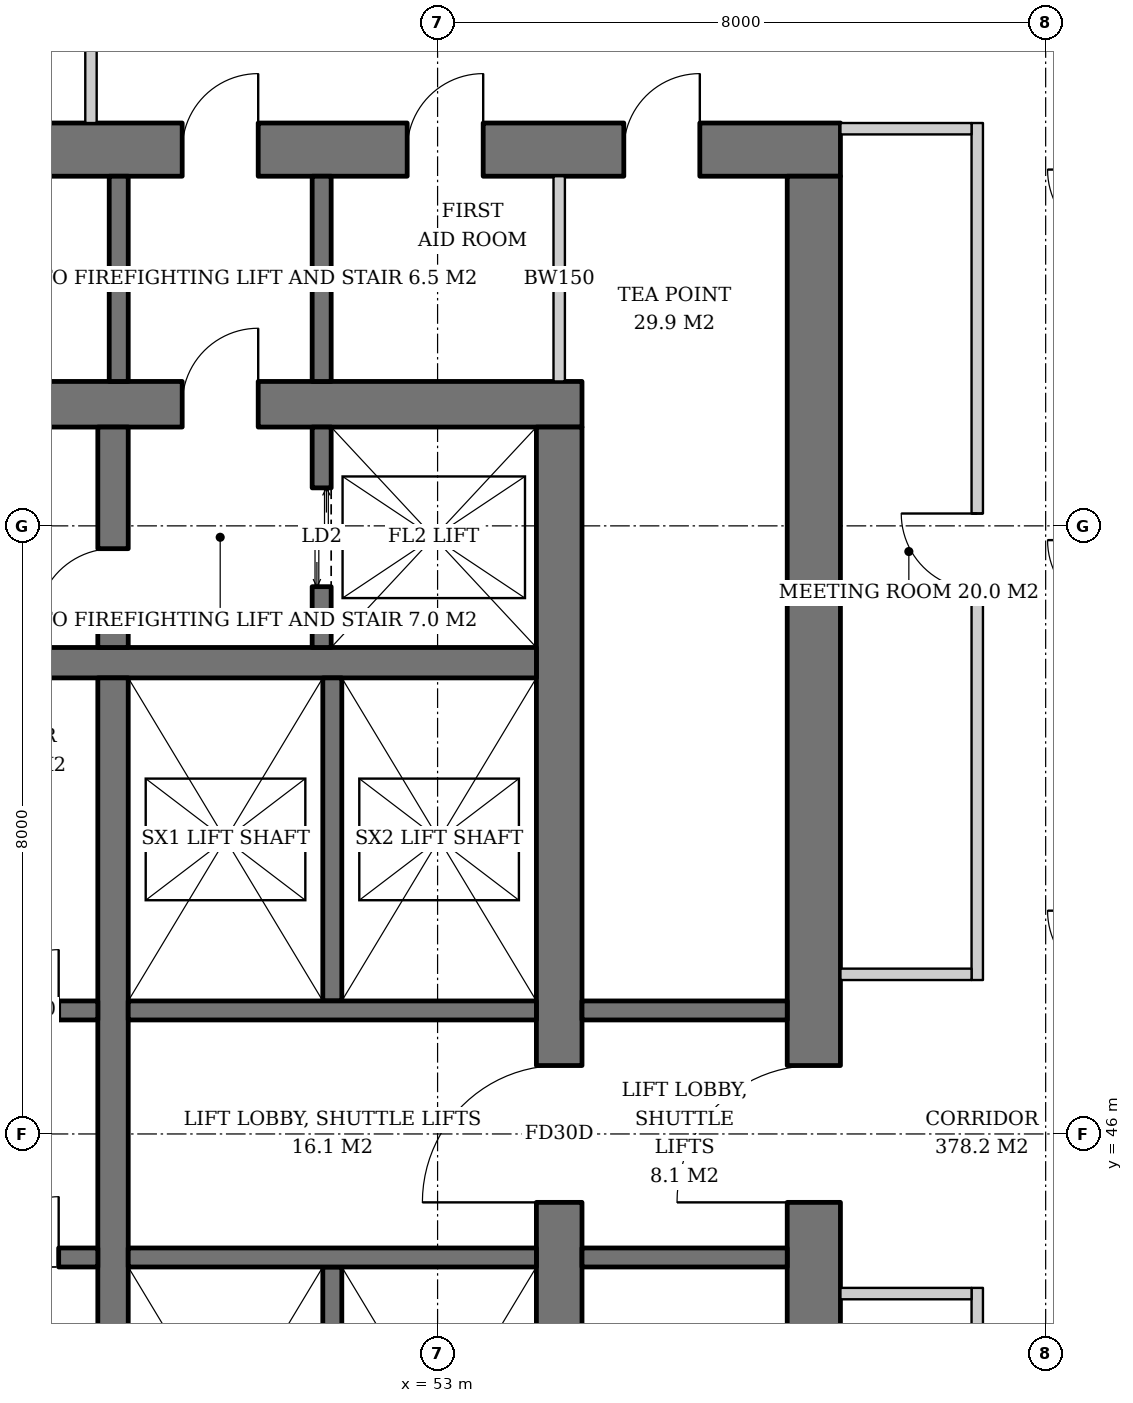
"""IFC4 building model, lengths in metres.
Left out: names, types, materials, properties, quantities, classifications, styles, units other than length and angle.
Written with IfcOpenShell. Run it as: python <this file> out.ifc"""

import sys

from ifc_helpers import new_model, si_unit, direction, frame, frame_2d, origin, place, context, subcontext, project, spatial, rectangle, extrude, element, fill, save


model = new_model("IFC4")
c1 = context("Model", 3, precision=1e-05, world=origin(), true_north=direction((0.0, 1.0)))
c2 = subcontext(c1, "Body", "Model", "MODEL_VIEW")
j1 = project(units=[si_unit("LENGTHUNIT", "METRE"), si_unit("PLANEANGLEUNIT", "RADIAN")], contexts=[c1])
p1 = place(None, origin())
s1 = spatial("IfcSite", under=j1, at=p1, CompositionType="ELEMENT")
p2 = place(p1, origin())
s2 = spatial("IfcBuilding", under=s1, at=p2, CompositionType="ELEMENT")
p3 = place(p2, frame((0.0, 0.0, 108.4)))
s3 = spatial("IfcBuildingStorey", under=s2, at=p3, CompositionType="ELEMENT", Elevation=108.4)
p4 = place(p3, frame((35.1, 55.6, 0.0), z_axis=(0.0, 0.0, 1.0), x_axis=(1.0, 0.0, 0.0)))
e1 = element("IfcWall", 1, at=p4, inside=s3, PredefinedType="SHEAR", context=c2, shape_type="SweptSolid", body=[
    extrude(rectangle(XDim=19.8, YDim=0.6, at=frame_2d((9.9, 0.0))), origin(), (0.0, 0.0, 1.0), 3.8),
])
p5 = place(p4, frame((14.54, 0.0, 0.0)))
e2 = element("IfcOpeningElement", 2, at=p5, cuts=e1, PredefinedType="OPENING", context=c2, shape_type="SweptSolid", body=[
    extrude(rectangle(XDim=1.0, YDim=2.1, at=frame_2d((0.5, 1.05))), frame((0.0, 0.31, 0.0), z_axis=(0.0, -1.0, 0.0), x_axis=(1.0, 0.0, 0.0)), (0.0, 0.0, 1.0), 0.62),
])
p6 = place(p4, frame((2.425, 0.0, 0.0)))
e3 = element("IfcOpeningElement", 3, at=p6, cuts=e1, PredefinedType="OPENING", context=c2, shape_type="SweptSolid", body=[
    extrude(rectangle(XDim=1.0, YDim=2.1, at=frame_2d((0.5, 1.05))), frame((0.0, 0.31, 0.0), z_axis=(0.0, -1.0, 0.0), x_axis=(1.0, 0.0, 0.0)), (0.0, 0.0, 1.0), 0.62),
])
p7 = place(p3, frame((54.6, 36.7, 0.0), z_axis=(0.0, 0.0, 1.0), x_axis=(0.0, 1.0, 0.0)))
e4 = element("IfcWall", 4, at=p7, inside=s3, PredefinedType="SHEAR", context=c2, shape_type="SweptSolid", body=[
    extrude(rectangle(XDim=18.6, YDim=0.6, at=frame_2d((9.3, 0.0))), origin(), (0.0, 0.0, 1.0), 3.8),
])
p8 = place(p7, frame((8.4, 0.0, 0.0)))
e5 = element("IfcOpeningElement", 5, at=p8, cuts=e4, PredefinedType="OPENING", context=c2, shape_type="SweptSolid", body=[
    extrude(rectangle(XDim=1.8, YDim=2.4, at=frame_2d((0.9, 1.2))), frame((0.0, 0.31, 0.0), z_axis=(0.0, -1.0, 0.0), x_axis=(1.0, 0.0, 0.0)), (0.0, 0.0, 1.0), 0.62),
])
p9 = place(p3, frame((31.7, 58.95, 0.0), z_axis=(0.0, 0.0, 1.0), x_axis=(1.0, 0.0, 0.0)))
e6 = element("IfcWall", 6, at=p9, inside=s3, PredefinedType="SHEAR", context=c2, shape_type="SweptSolid", body=[
    extrude(rectangle(XDim=26.6, YDim=0.7, at=frame_2d((13.3, 0.0))), origin(), (0.0, 0.0, 1.0), 3.8),
])
p10 = place(p9, frame((17.94, 0.0, 0.0)))
e7 = element("IfcOpeningElement", 7, at=p10, cuts=e6, PredefinedType="OPENING", context=c2, shape_type="SweptSolid", body=[
    extrude(rectangle(XDim=1.0, YDim=2.1, at=frame_2d((0.5, 1.05))), frame((0.0, 0.36, 0.0), z_axis=(0.0, -1.0, 0.0), x_axis=(1.0, 0.0, 0.0)), (0.0, 0.0, 1.0), 0.72),
])
p11 = place(p9, frame((5.825, 0.0, 0.0)))
e8 = element("IfcOpeningElement", 8, at=p11, cuts=e6, PredefinedType="OPENING", context=c2, shape_type="SweptSolid", body=[
    extrude(rectangle(XDim=1.0, YDim=2.1, at=frame_2d((0.5, 1.05))), frame((0.0, 0.36, 0.0), z_axis=(0.0, -1.0, 0.0), x_axis=(1.0, 0.0, 0.0)), (0.0, 0.0, 1.0), 0.72),
])
p12 = place(p9, frame((1.85, 0.0, 0.0)))
e9 = element("IfcOpeningElement", 9, at=p12, cuts=e6, PredefinedType="OPENING", context=c2, shape_type="SweptSolid", body=[
    extrude(rectangle(XDim=1.0, YDim=2.1, at=frame_2d((0.5, 1.05))), frame((0.0, 0.36, 0.0), z_axis=(0.0, -1.0, 0.0), x_axis=(1.0, 0.0, 0.0)), (0.0, 0.0, 1.0), 0.72),
])
p13 = place(p9, frame((4.115, 0.0, 0.0)))
e10 = element("IfcOpeningElement", 10, at=p13, cuts=e6, PredefinedType="OPENING", context=c2, shape_type="SweptSolid", body=[
    extrude(rectangle(XDim=1.0, YDim=2.1, at=frame_2d((0.5, 1.05))), frame((0.0, 0.36, 0.0), z_axis=(0.0, -1.0, 0.0), x_axis=(1.0, 0.0, 0.0)), (0.0, 0.0, 1.0), 0.72),
])
p14 = place(p9, frame((11.577, 0.0, 0.0)))
e11 = element("IfcOpeningElement", 11, at=p14, cuts=e6, PredefinedType="OPENING", context=c2, shape_type="SweptSolid", body=[
    extrude(rectangle(XDim=1.0, YDim=2.1, at=frame_2d((0.5, 1.05))), frame((0.0, 0.36, 0.0), z_axis=(0.0, -1.0, 0.0), x_axis=(1.0, 0.0, 0.0)), (0.0, 0.0, 1.0), 0.72),
])
p15 = place(p9, frame((20.9, 0.0, 0.0)))
e12 = element("IfcOpeningElement", 12, at=p15, cuts=e6, PredefinedType="OPENING", context=c2, shape_type="SweptSolid", body=[
    extrude(rectangle(XDim=1.0, YDim=2.1, at=frame_2d((0.5, 1.05))), frame((0.0, 0.36, 0.0), z_axis=(0.0, -1.0, 0.0), x_axis=(1.0, 0.0, 0.0)), (0.0, 0.0, 1.0), 0.72),
])
p16 = place(p9, frame((23.75, 0.0, 0.0)))
e13 = element("IfcOpeningElement", 13, at=p16, cuts=e6, PredefinedType="OPENING", context=c2, shape_type="SweptSolid", body=[
    extrude(rectangle(XDim=1.0, YDim=2.1, at=frame_2d((0.5, 1.05))), frame((0.0, 0.36, 0.0), z_axis=(0.0, -1.0, 0.0), x_axis=(1.0, 0.0, 0.0)), (0.0, 0.0, 1.0), 0.72),
])
p17 = place(p3, frame((57.95, 33.4, 0.0), z_axis=(0.0, 0.0, 1.0), x_axis=(0.0, 1.0, 0.0)))
e14 = element("IfcWall", 14, at=p17, inside=s3, PredefinedType="SHEAR", context=c2, shape_type="SweptSolid", body=[
    extrude(rectangle(XDim=25.2, YDim=0.7, at=frame_2d((12.6, 0.0))), origin(), (0.0, 0.0, 1.0), 3.8),
])
p18 = place(p17, frame((11.7, 0.0, 0.0)))
e15 = element("IfcOpeningElement", 15, at=p18, cuts=e14, PredefinedType="OPENING", context=c2, shape_type="SweptSolid", body=[
    extrude(rectangle(XDim=1.8, YDim=2.4, at=frame_2d((0.9, 1.2))), frame((0.0, 0.36, 0.0), z_axis=(0.0, -1.0, 0.0), x_axis=(1.0, 0.0, 0.0)), (0.0, 0.0, 1.0), 0.72),
])
p19 = place(p3, frame((35.7, 52.2, 0.0), z_axis=(0.0, 0.0, 1.0), x_axis=(1.0, 0.0, 0.0)))
e16 = element("IfcWall", 16, at=p19, inside=s3, PredefinedType="SHEAR", context=c2, shape_type="SweptSolid", body=[
    extrude(rectangle(XDim=18.6, YDim=0.4, at=frame_2d((9.3, 0.0))), origin(), (0.0, 0.0, 1.0), 3.8),
])
p20 = place(p3, frame((48.73, 40.0, 0.0), z_axis=(0.0, 0.0, 1.0), x_axis=(0.0, 1.0, 0.0)))
e17 = element("IfcWall", 17, at=p20, inside=s3, PredefinedType="SHEAR", context=c2, shape_type="SweptSolid", body=[
    extrude(rectangle(XDim=12.0, YDim=0.4, at=frame_2d((6.0, 0.0))), origin(), (0.0, 0.0, 1.0), 3.8),
])
p21 = place(p3, frame((48.73, 52.4, 0.0), z_axis=(0.0, 0.0, 1.0), x_axis=(0.0, 1.0, 0.0)))
e18 = element("IfcWall", 18, at=p21, inside=s3, PredefinedType="SHEAR", context=c2, shape_type="SweptSolid", body=[
    extrude(rectangle(XDim=2.9, YDim=0.4, at=frame_2d((1.45, 0.0))), origin(), (0.0, 0.0, 1.0), 3.8),
])
p22 = place(p21, frame((0.3, 0.0, 0.0)))
e19 = element("IfcOpeningElement", 19, at=p22, cuts=e18, PredefinedType="OPENING", context=c2, shape_type="SweptSolid", body=[
    extrude(rectangle(XDim=1.0, YDim=2.1, at=frame_2d((0.5, 1.05))), frame((0.0, 0.21, 0.0), z_axis=(0.0, -1.0, 0.0), x_axis=(1.0, 0.0, 0.0)), (0.0, 0.0, 1.0), 0.42),
])
p23 = place(p3, frame((51.475, 52.4, 0.0), z_axis=(0.0, 0.0, 1.0), x_axis=(0.0, 1.0, 0.0)))
e20 = element("IfcWall", 20, at=p23, inside=s3, PredefinedType="SHEAR", context=c2, shape_type="SweptSolid", body=[
    extrude(rectangle(XDim=2.9, YDim=0.25, at=frame_2d((1.45, 0.0))), origin(), (0.0, 0.0, 1.0), 3.8),
])
p24 = place(p23, frame((0.8, 0.0, 0.0)))
e21 = element("IfcOpeningElement", 21, at=p24, cuts=e20, PredefinedType="OPENING", context=c2, shape_type="SweptSolid", body=[
    extrude(rectangle(XDim=1.3, YDim=2.2, at=frame_2d((0.65, 1.1))), frame((0.0, 0.135, 0.0), z_axis=(0.0, -1.0, 0.0), x_axis=(1.0, 0.0, 0.0)), (0.0, 0.0, 1.0), 0.27),
])
p25 = place(p3, frame((35.7, 47.625, 0.0), z_axis=(0.0, 0.0, 1.0), x_axis=(1.0, 0.0, 0.0)))
e22 = element("IfcWall", 22, at=p25, inside=s3, PredefinedType="SHEAR", context=c2, shape_type="SweptSolid", body=[
    extrude(rectangle(XDim=12.83, YDim=0.25, at=frame_2d((6.415, 0.0))), origin(), (0.0, 0.0, 1.0), 3.8),
])
p26 = place(p25, frame((0.7, 0.0, 0.0)))
e23 = element("IfcOpeningElement", 23, at=p26, cuts=e22, PredefinedType="OPENING", context=c2, shape_type="SweptSolid", body=[
    extrude(rectangle(XDim=1.1, YDim=2.2, at=frame_2d((0.55, 1.1))), frame((0.0, 0.135, 0.0), z_axis=(0.0, -1.0, 0.0), x_axis=(1.0, 0.0, 0.0)), (0.0, 0.0, 1.0), 0.27),
])
p27 = place(p25, frame((3.45, 0.0, 0.0)))
e24 = element("IfcOpeningElement", 24, at=p27, cuts=e22, PredefinedType="OPENING", context=c2, shape_type="SweptSolid", body=[
    extrude(rectangle(XDim=1.1, YDim=2.2, at=frame_2d((0.55, 1.1))), frame((0.0, 0.135, 0.0), z_axis=(0.0, -1.0, 0.0), x_axis=(1.0, 0.0, 0.0)), (0.0, 0.0, 1.0), 0.27),
])
p28 = place(p25, frame((6.2, 0.0, 0.0)))
e25 = element("IfcOpeningElement", 25, at=p28, cuts=e22, PredefinedType="OPENING", context=c2, shape_type="SweptSolid", body=[
    extrude(rectangle(XDim=1.1, YDim=2.2, at=frame_2d((0.55, 1.1))), frame((0.0, 0.135, 0.0), z_axis=(0.0, -1.0, 0.0), x_axis=(1.0, 0.0, 0.0)), (0.0, 0.0, 1.0), 0.27),
])
p29 = place(p25, frame((8.95, 0.0, 0.0)))
e26 = element("IfcOpeningElement", 26, at=p29, cuts=e22, PredefinedType="OPENING", context=c2, shape_type="SweptSolid", body=[
    extrude(rectangle(XDim=1.1, YDim=2.2, at=frame_2d((0.55, 1.1))), frame((0.0, 0.135, 0.0), z_axis=(0.0, -1.0, 0.0), x_axis=(1.0, 0.0, 0.0)), (0.0, 0.0, 1.0), 0.27),
])
p30 = place(p25, frame((11.515, 0.0, 0.0)))
e27 = element("IfcOpeningElement", 27, at=p30, cuts=e22, PredefinedType="OPENING", context=c2, shape_type="SweptSolid", body=[
    extrude(rectangle(XDim=0.8, YDim=2.0, at=frame_2d((0.4, 1.0))), frame((0.0, 0.135, 0.0), z_axis=(0.0, -1.0, 0.0), x_axis=(1.0, 0.0, 0.0)), (0.0, 0.0, 1.0), 0.27),
])
p31 = place(p3, frame((35.7, 44.375, 0.0), z_axis=(0.0, 0.0, 1.0), x_axis=(1.0, 0.0, 0.0)))
e28 = element("IfcWall", 28, at=p31, inside=s3, PredefinedType="SHEAR", context=c2, shape_type="SweptSolid", body=[
    extrude(rectangle(XDim=12.83, YDim=0.25, at=frame_2d((6.415, 0.0))), origin(), (0.0, 0.0, 1.0), 3.8),
])
p32 = place(p31, frame((0.7, 0.0, 0.0)))
e29 = element("IfcOpeningElement", 29, at=p32, cuts=e28, PredefinedType="OPENING", context=c2, shape_type="SweptSolid", body=[
    extrude(rectangle(XDim=1.1, YDim=2.2, at=frame_2d((0.55, 1.1))), frame((0.0, 0.135, 0.0), z_axis=(0.0, -1.0, 0.0), x_axis=(1.0, 0.0, 0.0)), (0.0, 0.0, 1.0), 0.27),
])
p33 = place(p31, frame((3.45, 0.0, 0.0)))
e30 = element("IfcOpeningElement", 30, at=p33, cuts=e28, PredefinedType="OPENING", context=c2, shape_type="SweptSolid", body=[
    extrude(rectangle(XDim=1.1, YDim=2.2, at=frame_2d((0.55, 1.1))), frame((0.0, 0.135, 0.0), z_axis=(0.0, -1.0, 0.0), x_axis=(1.0, 0.0, 0.0)), (0.0, 0.0, 1.0), 0.27),
])
p34 = place(p31, frame((6.2, 0.0, 0.0)))
e31 = element("IfcOpeningElement", 31, at=p34, cuts=e28, PredefinedType="OPENING", context=c2, shape_type="SweptSolid", body=[
    extrude(rectangle(XDim=1.1, YDim=2.2, at=frame_2d((0.55, 1.1))), frame((0.0, 0.135, 0.0), z_axis=(0.0, -1.0, 0.0), x_axis=(1.0, 0.0, 0.0)), (0.0, 0.0, 1.0), 0.27),
])
p35 = place(p31, frame((8.95, 0.0, 0.0)))
e32 = element("IfcOpeningElement", 32, at=p35, cuts=e28, PredefinedType="OPENING", context=c2, shape_type="SweptSolid", body=[
    extrude(rectangle(XDim=1.1, YDim=2.2, at=frame_2d((0.55, 1.1))), frame((0.0, 0.135, 0.0), z_axis=(0.0, -1.0, 0.0), x_axis=(1.0, 0.0, 0.0)), (0.0, 0.0, 1.0), 0.27),
])
p36 = place(p31, frame((11.515, 0.0, 0.0)))
e33 = element("IfcOpeningElement", 33, at=p36, cuts=e28, PredefinedType="OPENING", context=c2, shape_type="SweptSolid", body=[
    extrude(rectangle(XDim=0.8, YDim=2.0, at=frame_2d((0.4, 1.0))), frame((0.0, 0.135, 0.0), z_axis=(0.0, -1.0, 0.0), x_axis=(1.0, 0.0, 0.0)), (0.0, 0.0, 1.0), 0.27),
])
p37 = place(p3, frame((51.615, 47.75, 0.0), z_axis=(0.0, 0.0, 1.0), x_axis=(0.0, 1.0, 0.0)))
e34 = element("IfcWall", 34, at=p37, inside=s3, PredefinedType="SHEAR", context=c2, shape_type="SweptSolid", body=[
    extrude(rectangle(XDim=4.25, YDim=0.25, at=frame_2d((2.125, 0.0))), origin(), (0.0, 0.0, 1.0), 3.8),
])
p38 = place(p3, frame((48.93, 47.625, 0.0), z_axis=(0.0, 0.0, 1.0), x_axis=(1.0, 0.0, 0.0)))
e35 = element("IfcWall", 35, at=p38, inside=s3, PredefinedType="SHEAR", context=c2, shape_type="SweptSolid", body=[
    extrude(rectangle(XDim=5.37, YDim=0.25, at=frame_2d((2.685, 0.0))), origin(), (0.0, 0.0, 1.0), 3.8),
])
p39 = place(p3, frame((51.615, 44.25, 0.0), z_axis=(0.0, 0.0, 1.0), x_axis=(0.0, -1.0, 0.0)))
e36 = element("IfcWall", 36, at=p39, inside=s3, PredefinedType="SHEAR", context=c2, shape_type="SweptSolid", body=[
    extrude(rectangle(XDim=4.25, YDim=0.25, at=frame_2d((2.125, 0.0))), origin(), (0.0, 0.0, 1.0), 3.8),
])
p40 = place(p3, frame((48.93, 44.375, 0.0), z_axis=(0.0, 0.0, 1.0), x_axis=(1.0, 0.0, 0.0)))
e37 = element("IfcWall", 37, at=p40, inside=s3, PredefinedType="SHEAR", context=c2, shape_type="SweptSolid", body=[
    extrude(rectangle(XDim=5.37, YDim=0.25, at=frame_2d((2.685, 0.0))), origin(), (0.0, 0.0, 1.0), 3.8),
])
for number, where, z_axis, x_axis in (
    (38, (48.805, 55.9, 0.0), (0.0, 0.0, 1.0), (0.0, 1.0, 0.0)),
    (39, (51.475, 55.9, 0.0), (0.0, 0.0, 1.0), (0.0, 1.0, 0.0)),
    (40, (54.9, 44.375, 0.0), (0.0, 0.0, 1.0), (1.0, 0.0, 0.0)),
    (41, (54.9, 47.625, 0.0), (0.0, 0.0, 1.0), (1.0, 0.0, 0.0)),
):
    element("IfcWall", number, at=place(p3, frame(where, z_axis=z_axis, x_axis=x_axis)), inside=s3, PredefinedType="SOLIDWALL", context=c2, shape_type="SweptSolid", body=[
        extrude(rectangle(XDim=2.7, YDim=0.25, at=frame_2d((1.35, 0.0))), origin(), (0.0, 0.0, 1.0), 3.62),
    ])
p41 = place(p3, frame((54.6, 55.9, 0.0), z_axis=(0.0, 0.0, 1.0), x_axis=(0.0, 1.0, 0.0)))
e42 = element("IfcWall", 42, at=p41, inside=s3, PredefinedType="SOLIDWALL", context=c2, shape_type="SweptSolid", body=[
    extrude(rectangle(XDim=2.7, YDim=0.15, at=frame_2d((1.35, 0.0))), origin(), (0.0, 0.0, 1.0), 3.62),
])
p42 = place(p3, frame((60.1, 32.7, 0.0), z_axis=(0.0, 0.0, 1.0), x_axis=(0.0, 1.0, 0.0)))
e43 = element("IfcWall", 43, at=p42, inside=s3, PredefinedType="PARTITIONING", context=c2, shape_type="SweptSolid", body=[
    extrude(rectangle(XDim=11.275, YDim=0.15, at=frame_2d((5.638, 0.0))), origin(), (0.0, 0.0, 1.0), 2.72),
])
p43 = place(p42, frame((5.137, 0.0, 0.0)))
e44 = element("IfcOpeningElement", 44, at=p43, cuts=e43, PredefinedType="OPENING", context=c2, shape_type="SweptSolid", body=[
    extrude(rectangle(XDim=1.0, YDim=2.1, at=frame_2d((0.5, 1.05))), frame((0.0, 0.085, 0.0), z_axis=(0.0, -1.0, 0.0), x_axis=(1.0, 0.0, 0.0)), (0.0, 0.0, 1.0), 0.17),
])
p44 = place(p3, frame((58.3, 43.9, 0.0), z_axis=(0.0, 0.0, 1.0), x_axis=(1.0, 0.0, 0.0)))
e45 = element("IfcWall", 45, at=p44, inside=s3, PredefinedType="PARTITIONING", context=c2, shape_type="SweptSolid", body=[
    extrude(rectangle(XDim=1.725, YDim=0.15, at=frame_2d((0.862, 0.0))), origin(), (0.0, 0.0, 1.0), 3.62),
])
p45 = place(p3, frame((60.1, 48.025, 0.0), z_axis=(0.0, 0.0, 1.0), x_axis=(0.0, 1.0, 0.0)))
e46 = element("IfcWall", 46, at=p45, inside=s3, PredefinedType="PARTITIONING", context=c2, shape_type="SweptSolid", body=[
    extrude(rectangle(XDim=11.275, YDim=0.15, at=frame_2d((5.638, 0.0))), origin(), (0.0, 0.0, 1.0), 2.806),
])
p46 = place(p45, frame((5.137, 0.0, 0.0)))
e47 = element("IfcOpeningElement", 47, at=p46, cuts=e46, PredefinedType="OPENING", context=c2, shape_type="SweptSolid", body=[
    extrude(rectangle(XDim=1.0, YDim=2.1, at=frame_2d((0.5, 1.05))), frame((0.0, 0.085, 0.0), z_axis=(0.0, -1.0, 0.0), x_axis=(1.0, 0.0, 0.0)), (0.0, 0.0, 1.0), 0.17),
])
for number, where, z_axis, x_axis in (
    (48, (58.3, 48.1, 0.0), (0.0, 0.0, 1.0), (1.0, 0.0, 0.0)),
    (49, (58.3, 59.225, 0.0), (0.0, 0.0, 1.0), (1.0, 0.0, 0.0)),
    (50, (48.44, 59.3, 0.0), (0.0, 0.0, 1.0), (0.0, 1.0, 0.0)),
):
    element("IfcWall", number, at=place(p3, frame(where, z_axis=z_axis, x_axis=x_axis)), inside=s3, PredefinedType="PARTITIONING", context=c2, shape_type="SweptSolid", body=[
        extrude(rectangle(XDim=1.725, YDim=0.15, at=frame_2d((0.862, 0.0))), origin(), (0.0, 0.0, 1.0), 3.62),
    ])
p47 = place(p24, origin())
e51 = element("IfcDoor", 51, at=p47, inside=s3, OperationType="DOUBLE_DOOR_SLIDING", PredefinedType="DOOR", context=c2, shape_type="SweptSolid", body=[
    extrude(rectangle(XDim=1.3, YDim=2.2, at=frame_2d((0.65, 1.1))), frame((0.0, 0.025, 0.0), z_axis=(0.0, -1.0, 0.0), x_axis=(1.0, 0.0, 0.0)), (0.0, 0.0, 1.0), 0.05),
])
fill(e21, e51)
p48 = place(p30, origin())
e52 = element("IfcDoor", 52, at=p48, inside=s3, OperationType="SINGLE_SWING_RIGHT", PredefinedType="DOOR", context=c2, shape_type="SweptSolid", body=[
    extrude(rectangle(XDim=0.8, YDim=2.0, at=frame_2d((0.4, 1.0))), frame((0.0, 0.025, 0.0), z_axis=(0.0, -1.0, 0.0), x_axis=(1.0, 0.0, 0.0)), (0.0, 0.0, 1.0), 0.05),
])
fill(e27, e52)
p49 = place(p36, origin())
e53 = element("IfcDoor", 53, at=p49, inside=s3, OperationType="SINGLE_SWING_RIGHT", PredefinedType="DOOR", context=c2, shape_type="SweptSolid", body=[
    extrude(rectangle(XDim=0.8, YDim=2.0, at=frame_2d((0.4, 1.0))), frame((0.0, 0.025, 0.0), z_axis=(0.0, -1.0, 0.0), x_axis=(1.0, 0.0, 0.0)), (0.0, 0.0, 1.0), 0.05),
])
fill(e33, e53)
p50 = place(p22, origin())
e54 = element("IfcDoor", 54, at=p50, inside=s3, OperationType="SINGLE_SWING_LEFT", PredefinedType="DOOR", context=c2, shape_type="SweptSolid", body=[
    extrude(rectangle(XDim=1.0, YDim=2.1, at=frame_2d((0.5, 1.05))), frame((0.0, 0.025, 0.0), z_axis=(0.0, -1.0, 0.0), x_axis=(1.0, 0.0, 0.0)), (0.0, 0.0, 1.0), 0.05),
])
fill(e19, e54)
p51 = place(p5, origin())
e55 = element("IfcDoor", 55, at=p51, inside=s3, OperationType="SINGLE_SWING_RIGHT", PredefinedType="DOOR", context=c2, shape_type="SweptSolid", body=[
    extrude(rectangle(XDim=1.0, YDim=2.1, at=frame_2d((0.5, 1.05))), frame((0.0, 0.025, 0.0), z_axis=(0.0, -1.0, 0.0), x_axis=(1.0, 0.0, 0.0)), (0.0, 0.0, 1.0), 0.05),
])
fill(e2, e55)
p52 = place(p8, origin())
e56 = element("IfcDoor", 56, at=p52, inside=s3, OperationType="DOUBLE_DOOR_SINGLE_SWING", PredefinedType="DOOR", context=c2, shape_type="SweptSolid", body=[
    extrude(rectangle(XDim=1.8, YDim=2.4, at=frame_2d((0.9, 1.2))), frame((0.0, 0.025, 0.0), z_axis=(0.0, -1.0, 0.0), x_axis=(1.0, 0.0, 0.0)), (0.0, 0.0, 1.0), 0.05),
])
fill(e5, e56)
p53 = place(p18, origin())
e57 = element("IfcDoor", 57, at=p53, inside=s3, OperationType="DOUBLE_DOOR_SINGLE_SWING", PredefinedType="DOOR", context=c2, shape_type="SweptSolid", body=[
    extrude(rectangle(XDim=1.8, YDim=2.4, at=frame_2d((0.9, 1.2))), frame((0.0, 0.025, 0.0), z_axis=(0.0, -1.0, 0.0), x_axis=(1.0, 0.0, 0.0)), (0.0, 0.0, 1.0), 0.05),
])
fill(e15, e57)
p54 = place(p10, origin())
e58 = element("IfcDoor", 58, at=p54, inside=s3, OperationType="SINGLE_SWING_RIGHT", PredefinedType="DOOR", context=c2, shape_type="SweptSolid", body=[
    extrude(rectangle(XDim=1.0, YDim=2.1, at=frame_2d((0.5, 1.05))), frame((0.0, 0.025, 0.0), z_axis=(0.0, -1.0, 0.0), x_axis=(1.0, 0.0, 0.0)), (0.0, 0.0, 1.0), 0.05),
])
fill(e7, e58)
p55 = place(p15, origin())
e59 = element("IfcDoor", 59, at=p55, inside=s3, OperationType="SINGLE_SWING_RIGHT", PredefinedType="DOOR", context=c2, shape_type="SweptSolid", body=[
    extrude(rectangle(XDim=1.0, YDim=2.1, at=frame_2d((0.5, 1.05))), frame((0.0, -0.29, 0.0), z_axis=(0.0, -1.0, 0.0), x_axis=(1.0, 0.0, 0.0)), (0.0, 0.0, 1.0), 0.05),
])
fill(e12, e59)
p56 = place(p16, origin())
e60 = element("IfcDoor", 60, at=p56, inside=s3, OperationType="SINGLE_SWING_RIGHT", PredefinedType="DOOR", context=c2, shape_type="SweptSolid", body=[
    extrude(rectangle(XDim=1.0, YDim=2.1, at=frame_2d((0.5, 1.05))), frame((0.0, -0.29, 0.0), z_axis=(0.0, -1.0, 0.0), x_axis=(1.0, 0.0, 0.0)), (0.0, 0.0, 1.0), 0.05),
])
fill(e13, e60)
p57 = place(p46, origin())
e61 = element("IfcDoor", 61, at=p57, inside=s3, OperationType="SINGLE_SWING_RIGHT", PredefinedType="DOOR", context=c2, shape_type="SweptSolid", body=[
    extrude(rectangle(XDim=1.0, YDim=2.1, at=frame_2d((0.5, 1.05))), frame((0.0, 0.025, 0.0), z_axis=(0.0, -1.0, 0.0), x_axis=(1.0, 0.0, 0.0)), (0.0, 0.0, 1.0), 0.05),
])
fill(e47, e61)
save(model, sys.argv[1])
